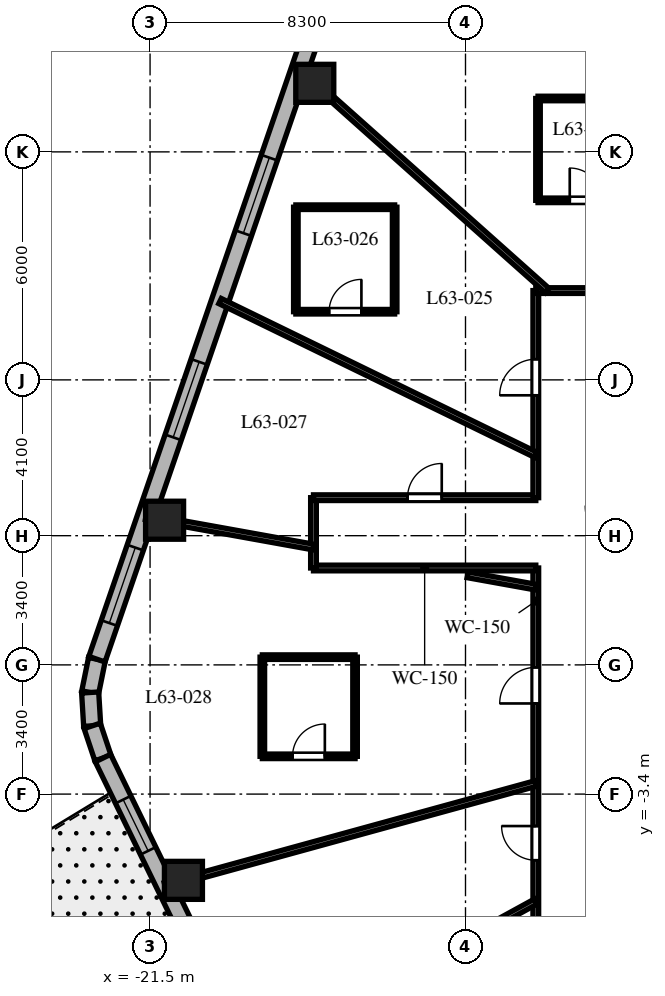
"""IFC4 building model, lengths in metres.
Left out: names, types, materials, properties, quantities, classifications, styles, units other than length and angle.
Written with IfcOpenShell. Run it as: python <this file> out.ifc"""

import sys

from ifc_helpers import new_model, si_unit, direction, frame, frame_2d, origin, origin_2d, place, context, subcontext, project, spatial, rectangle, extrude, element, fill, save


model = new_model("IFC4")
c1 = context("Model", 3, precision=1e-05, world=origin(), true_north=direction((0.0, 1.0)))
c2 = subcontext(c1, "Body", "Model", "MODEL_VIEW")
j1 = project(units=[si_unit("LENGTHUNIT", "METRE"), si_unit("PLANEANGLEUNIT", "RADIAN")], contexts=[c1])
p1 = place(None, origin())
s1 = spatial("IfcSite", under=j1, at=p1, CompositionType="ELEMENT")
p2 = place(p1, origin())
s2 = spatial("IfcBuilding", under=s1, at=p2, CompositionType="ELEMENT")
p3 = place(p2, frame((0.0, 0.0, 252.1)))
s3 = spatial("IfcBuildingStorey", under=s2, at=p3, CompositionType="ELEMENT", Elevation=252.1)
for number, where, z_axis, x_axis in (
    (1, (-17.166, 15.304, 0.0), (0.0, 0.0, 1.0), (1.0, 0.0, 0.0)),
    (2, (-21.118, 3.807, 0.0), (0.0, 0.0, 1.0), (1.0, 0.0, 0.0)),
    (3, (-20.622, -5.67, 0.0), (0.0, 0.0, 1.0), (1.0, 0.0, 0.0)),
):
    element("IfcColumn", number, at=place(p3, frame(where, z_axis=z_axis, x_axis=x_axis)), inside=s3, PredefinedType="COLUMN", context=c2, shape_type="SweptSolid", body=[
        extrude(rectangle(XDim=1.0, YDim=1.0, at=origin_2d()), origin(), (0.0, 0.0, 1.0), 3.8),
    ])
p4 = place(p3, frame((-22.898, 0.15, 0.0), z_axis=(0.0, 0.0, 1.0), x_axis=(-0.199055826889, -0.979988151858, 0.0)))
e4 = element("IfcWall", 4, at=p4, inside=s3, PredefinedType="SOLIDWALL", context=c2, shape_type="SweptSolid", body=[
    extrude(rectangle(XDim=0.894, YDim=0.45, at=frame_2d((0.447, 0.0))), origin(), (0.0, 0.0, 1.0), 3.48),
])
p5 = place(p3, frame((-23.076, -0.727, 0.0), z_axis=(0.0, 0.0, 1.0), x_axis=(0.060805222108, -0.998149650586, 0.0)))
e5 = element("IfcWall", 5, at=p5, inside=s3, PredefinedType="SOLIDWALL", context=c2, shape_type="SweptSolid", body=[
    extrude(rectangle(XDim=0.879, YDim=0.45, at=frame_2d((0.44, 0.0))), origin(), (0.0, 0.0, 1.0), 3.48),
])
p6 = place(p3, frame((-23.023, -1.604, 0.0), z_axis=(0.0, 0.0, 1.0), x_axis=(0.316801227695, -0.948491951537, 0.0)))
e6 = element("IfcWall", 6, at=p6, inside=s3, PredefinedType="SOLIDWALL", context=c2, shape_type="SweptSolid", body=[
    extrude(rectangle(XDim=0.894, YDim=0.45, at=frame_2d((0.447, 0.0))), origin(), (0.0, 0.0, 1.0), 3.48),
])
p7 = place(p3, frame((-16.324, 19.275, 0.0), z_axis=(0.0, 0.0, 1.0), x_axis=(-0.325083142304, -0.945685439557, 0.0)))
e7 = element("IfcWall", 7, at=p7, inside=s3, PredefinedType="SOLIDWALL", context=c2, shape_type="SweptSolid", body=[
    extrude(rectangle(XDim=20.224, YDim=0.45, at=frame_2d((10.112, 0.0))), origin(), (0.0, 0.0, 1.0), 3.48),
])
p8 = place(p7, frame((0.953, 0.0, 0.8)))
e8 = element("IfcOpeningElement", 8, at=p8, cuts=e7, PredefinedType="OPENING", context=c2, shape_type="SweptSolid", body=[
    extrude(rectangle(XDim=2.1, YDim=1.85, at=frame_2d((1.05, 0.925))), frame((0.0, 0.235, 0.0), z_axis=(0.0, -1.0, 0.0), x_axis=(1.0, 0.0, 0.0)), (0.0, 0.0, 1.0), 0.47),
])
p9 = place(p7, frame((6.268, 0.0, 0.8)))
e9 = element("IfcOpeningElement", 9, at=p9, cuts=e7, PredefinedType="OPENING", context=c2, shape_type="SweptSolid", body=[
    extrude(rectangle(XDim=2.1, YDim=1.85, at=frame_2d((1.05, 0.925))), frame((0.0, 0.235, 0.0), z_axis=(0.0, -1.0, 0.0), x_axis=(1.0, 0.0, 0.0)), (0.0, 0.0, 1.0), 0.47),
])
p10 = place(p7, frame((11.95, 0.0, 0.8)))
e10 = element("IfcOpeningElement", 10, at=p10, cuts=e7, PredefinedType="OPENING", context=c2, shape_type="SweptSolid", body=[
    extrude(rectangle(XDim=2.1, YDim=1.85, at=frame_2d((1.05, 0.925))), frame((0.0, 0.235, 0.0), z_axis=(0.0, -1.0, 0.0), x_axis=(1.0, 0.0, 0.0)), (0.0, 0.0, 1.0), 0.47),
])
p11 = place(p7, frame((17.118, 0.0, 0.8)))
e11 = element("IfcOpeningElement", 11, at=p11, cuts=e7, PredefinedType="OPENING", context=c2, shape_type="SweptSolid", body=[
    extrude(rectangle(XDim=2.1, YDim=1.85, at=frame_2d((1.05, 0.925))), frame((0.0, 0.235, 0.0), z_axis=(0.0, -1.0, 0.0), x_axis=(1.0, 0.0, 0.0)), (0.0, 0.0, 1.0), 0.47),
])
p12 = place(p3, frame((-22.74, -2.452, 0.0), z_axis=(0.0, 0.0, 1.0), x_axis=(0.437753424814, -0.899095066755, 0.0)))
e12 = element("IfcWall", 12, at=p12, inside=s3, PredefinedType="SOLIDWALL", context=c2, shape_type="SweptSolid", body=[
    extrude(rectangle(XDim=19.137, YDim=0.45, at=frame_2d((9.569, 0.0))), origin(), (0.0, 0.0, 1.0), 3.48),
])
p13 = place(p12, frame((4.763, 0.0, 0.0)))
e13 = element("IfcOpeningElement", 13, at=p13, cuts=e12, PredefinedType="OPENING", context=c2, shape_type="SweptSolid", body=[
    extrude(rectangle(XDim=0.95, YDim=2.15, at=frame_2d((0.475, 1.075))), frame((0.0, 0.235, 0.0), z_axis=(0.0, -1.0, 0.0), x_axis=(1.0, 0.0, 0.0)), (0.0, 0.0, 1.0), 0.47),
])
p14 = place(p12, frame((1.216, 0.0, 0.8)))
e14 = element("IfcOpeningElement", 14, at=p14, cuts=e12, PredefinedType="OPENING", context=c2, shape_type="SweptSolid", body=[
    extrude(rectangle(XDim=1.5, YDim=1.8, at=frame_2d((0.75, 0.9))), frame((0.0, 0.235, 0.0), z_axis=(0.0, -1.0, 0.0), x_axis=(1.0, 0.0, 0.0)), (0.0, 0.0, 1.0), 0.47),
])
p15 = place(p12, frame((6.461, 0.0, 0.8)))
e15 = element("IfcOpeningElement", 15, at=p15, cuts=e12, PredefinedType="OPENING", context=c2, shape_type="SweptSolid", body=[
    extrude(rectangle(XDim=1.5, YDim=1.8, at=frame_2d((0.75, 0.9))), frame((0.0, 0.235, 0.0), z_axis=(0.0, -1.0, 0.0), x_axis=(1.0, 0.0, 0.0)), (0.0, 0.0, 1.0), 0.47),
])
p16 = place(p12, frame((11.156, 0.0, 0.8)))
e16 = element("IfcOpeningElement", 16, at=p16, cuts=e12, PredefinedType="OPENING", context=c2, shape_type="SweptSolid", body=[
    extrude(rectangle(XDim=1.5, YDim=1.8, at=frame_2d((0.75, 0.9))), frame((0.0, 0.235, 0.0), z_axis=(0.0, -1.0, 0.0), x_axis=(1.0, 0.0, 0.0)), (0.0, 0.0, 1.0), 0.47),
])
p17 = place(p12, frame((16.473, 0.0, 0.8)))
e17 = element("IfcOpeningElement", 17, at=p17, cuts=e12, PredefinedType="OPENING", context=c2, shape_type="SweptSolid", body=[
    extrude(rectangle(XDim=1.5, YDim=1.8, at=frame_2d((0.75, 0.9))), frame((0.0, 0.235, 0.0), z_axis=(0.0, -1.0, 0.0), x_axis=(1.0, 0.0, 0.0)), (0.0, 0.0, 1.0), 0.47),
])
p18 = place(p3, frame((-11.35, -9.85, 0.0), z_axis=(0.0, 0.0, 1.0), x_axis=(0.0, 1.0, 0.0)))
e18 = element("IfcWall", 18, at=p18, inside=s3, PredefinedType="PARTITIONING", context=c2, shape_type="SweptSolid", body=[
    extrude(rectangle(XDim=12.4, YDim=0.15, at=frame_2d((6.2, 0.0))), origin(), (0.0, 0.0, 1.0), 2.97),
])
p19 = place(p18, frame((8.835, 0.0, 0.0)))
e19 = element("IfcOpeningElement", 19, at=p19, cuts=e18, PredefinedType="OPENING", context=c2, shape_type="SweptSolid", body=[
    extrude(rectangle(XDim=0.95, YDim=2.03, at=frame_2d((0.475, 1.015))), frame((0.0, 0.085, 0.0), z_axis=(0.0, -1.0, 0.0), x_axis=(1.0, 0.0, 0.0)), (0.0, 0.0, 1.0), 0.17),
])
p20 = place(p18, frame((4.709, 0.0, 0.0)))
e20 = element("IfcOpeningElement", 20, at=p20, cuts=e18, PredefinedType="OPENING", context=c2, shape_type="SweptSolid", body=[
    extrude(rectangle(XDim=0.9, YDim=2.03, at=frame_2d((0.45, 1.015))), frame((0.0, 0.085, 0.0), z_axis=(0.0, -1.0, 0.0), x_axis=(1.0, 0.0, 0.0)), (0.0, 0.0, 1.0), 0.17),
])
p21 = place(p18, frame((1.457, 0.0, 0.0)))
e21 = element("IfcOpeningElement", 21, at=p21, cuts=e18, PredefinedType="OPENING", context=c2, shape_type="SweptSolid", body=[
    extrude(rectangle(XDim=0.95, YDim=2.03, at=frame_2d((0.475, 1.015))), frame((0.0, 0.085, 0.0), z_axis=(0.0, -1.0, 0.0), x_axis=(1.0, 0.0, 0.0)), (0.0, 0.0, 1.0), 0.17),
])
p22 = place(p3, frame((-11.35, 2.55, 0.0), z_axis=(0.0, 0.0, 1.0), x_axis=(-1.0, 0.0, 0.0)))
e22 = element("IfcWall", 22, at=p22, inside=s3, PredefinedType="PARTITIONING", context=c2, shape_type="SweptSolid", body=[
    extrude(rectangle(XDim=5.85, YDim=0.15, at=frame_2d((2.925, 0.0))), origin(), (0.0, 0.0, 1.0), 2.92),
])
p23 = place(p3, frame((-17.2, 2.55, 0.0), z_axis=(0.0, 0.0, 1.0), x_axis=(0.0, 1.0, 0.0)))
e23 = element("IfcWall", 23, at=p23, inside=s3, PredefinedType="PARTITIONING", context=c2, shape_type="SweptSolid", body=[
    extrude(rectangle(XDim=1.85, YDim=0.15, at=frame_2d((0.925, 0.0))), origin(), (0.0, 0.0, 1.0), 2.92),
])
p24 = place(p3, frame((-17.2, 4.4, 0.0), z_axis=(0.0, 0.0, 1.0), x_axis=(1.0, 0.0, 0.0)))
e24 = element("IfcWall", 24, at=p24, inside=s3, PredefinedType="PARTITIONING", context=c2, shape_type="SweptSolid", body=[
    extrude(rectangle(XDim=5.85, YDim=0.15, at=frame_2d((2.925, 0.0))), origin(), (0.0, 0.0, 1.0), 2.92),
])
p25 = place(p24, frame((2.475, 0.0, 0.0)))
e25 = element("IfcOpeningElement", 25, at=p25, cuts=e24, PredefinedType="OPENING", context=c2, shape_type="SweptSolid", body=[
    extrude(rectangle(XDim=0.9, YDim=2.03, at=frame_2d((0.45, 1.015))), frame((0.0, 0.085, 0.0), z_axis=(0.0, -1.0, 0.0), x_axis=(1.0, 0.0, 0.0)), (0.0, 0.0, 1.0), 0.17),
])
p26 = place(p3, frame((-11.35, 4.4, 0.0), z_axis=(0.0, 0.0, 1.0), x_axis=(0.0, 1.0, 0.0)))
e26 = element("IfcWall", 26, at=p26, inside=s3, PredefinedType="PARTITIONING", context=c2, shape_type="SweptSolid", body=[
    extrude(rectangle(XDim=5.45, YDim=0.15, at=frame_2d((2.725, 0.0))), origin(), (0.0, 0.0, 1.0), 2.97),
])
p27 = place(p26, frame((2.694, 0.0, 0.0)))
e27 = element("IfcOpeningElement", 27, at=p27, cuts=e26, PredefinedType="OPENING", context=c2, shape_type="SweptSolid", body=[
    extrude(rectangle(XDim=0.95, YDim=2.03, at=frame_2d((0.475, 1.015))), frame((0.0, 0.085, 0.0), z_axis=(0.0, -1.0, 0.0), x_axis=(1.0, 0.0, 0.0)), (0.0, 0.0, 1.0), 0.17),
])
p28 = place(p3, frame((-11.35, 9.85, 0.0), z_axis=(0.0, 0.0, 1.0), x_axis=(1.0, 0.0, 0.0)))
e28 = element("IfcWall", 28, at=p28, inside=s3, PredefinedType="PARTITIONING", context=c2, shape_type="SweptSolid", body=[
    extrude(rectangle(XDim=10.43, YDim=0.15, at=frame_2d((5.215, 0.0))), origin(), (0.0, 0.0, 1.0), 2.97),
])
p29 = place(p28, frame((8.362, 0.0, 0.0)))
e29 = element("IfcOpeningElement", 29, at=p29, cuts=e28, PredefinedType="OPENING", context=c2, shape_type="SweptSolid", body=[
    extrude(rectangle(XDim=0.95, YDim=2.03, at=frame_2d((0.475, 1.015))), frame((0.0, 0.085, 0.0), z_axis=(0.0, -1.0, 0.0), x_axis=(1.0, 0.0, 0.0)), (0.0, 0.0, 1.0), 0.17),
])
p30 = place(p28, frame((3.396, 0.0, 0.0)))
e30 = element("IfcOpeningElement", 30, at=p30, cuts=e28, PredefinedType="OPENING", context=c2, shape_type="SweptSolid", body=[
    extrude(rectangle(XDim=0.95, YDim=2.03, at=frame_2d((0.475, 1.015))), frame((0.0, 0.085, 0.0), z_axis=(0.0, -1.0, 0.0), x_axis=(1.0, 0.0, 0.0)), (0.0, 0.0, 1.0), 0.17),
])
p31 = place(p3, frame((-11.048, 9.85, 0.0), z_axis=(0.0, 0.0, 1.0), x_axis=(-0.746444434655, 0.665447748492, 0.0)))
e31 = element("IfcWall", 31, at=p31, inside=s3, PredefinedType="PARTITIONING", context=c2, shape_type="SweptSolid", body=[
    extrude(rectangle(XDim=8.732, YDim=0.15, at=frame_2d((4.366, 0.0))), origin(), (0.0, 0.0, 1.0), 2.72),
])
p32 = place(p3, frame((-11.35, 5.528, 0.0), z_axis=(0.0, 0.0, 1.0), x_axis=(-0.899038669565, 0.437869239188, 0.0)))
e32 = element("IfcWall", 32, at=p32, inside=s3, PredefinedType="PARTITIONING", context=c2, shape_type="SweptSolid", body=[
    extrude(rectangle(XDim=9.242, YDim=0.15, at=frame_2d((4.621, 0.0))), origin(), (0.0, 0.0, 1.0), 2.72),
])
p33 = place(p3, frame((-11.35, 2.046, 0.0), z_axis=(0.0, 0.0, 1.0), x_axis=(-0.984127783205, 0.177461281195, 0.0)))
e33 = element("IfcWall", 33, at=p33, inside=s3, PredefinedType="PARTITIONING", context=c2, shape_type="SweptSolid", body=[
    extrude(rectangle(XDim=1.826, YDim=0.15, at=frame_2d((0.913, 0.0))), origin(), (0.0, 0.0, 1.0), 3.48),
])
p34 = place(p3, frame((-17.2, 3.101, 0.0), z_axis=(0.0, 0.0, 1.0), x_axis=(-0.98413465883, 0.177423147559, 0.0)))
e34 = element("IfcWall", 34, at=p34, inside=s3, PredefinedType="PARTITIONING", context=c2, shape_type="SweptSolid", body=[
    extrude(rectangle(XDim=4.482, YDim=0.15, at=frame_2d((2.241, 0.0))), origin(), (0.0, 0.0, 1.0), 2.72),
])
p35 = place(p3, frame((-11.35, -3.121, 0.0), z_axis=(0.0, 0.0, 1.0), x_axis=(-0.964212793822, -0.265129568758, 0.0)))
e35 = element("IfcWall", 35, at=p35, inside=s3, PredefinedType="PARTITIONING", context=c2, shape_type="SweptSolid", body=[
    extrude(rectangle(XDim=10.12, YDim=0.15, at=frame_2d((5.06, 0.0))), origin(), (0.0, 0.0, 1.0), 2.72),
])
p36 = place(p3, frame((-11.35, -6.227, 0.0), z_axis=(0.0, 0.0, 1.0), x_axis=(-0.876723190824, -0.480995266786, 0.0)))
e36 = element("IfcWall", 36, at=p36, inside=s3, PredefinedType="PARTITIONING", context=c2, shape_type="SweptSolid", body=[
    extrude(rectangle(XDim=8.598, YDim=0.15, at=frame_2d((4.299, 0.0))), origin(), (0.0, 0.0, 1.0), 2.72),
])
p37 = place(p3, frame((-11.292, 12.225, 0.0), z_axis=(0.0, 0.0, 1.0), x_axis=(1.0, 0.0, 0.0)))
e37 = element("IfcWall", 37, at=p37, inside=s3, PredefinedType="PARTITIONING", context=c2, shape_type="SweptSolid", body=[
    extrude(rectangle(XDim=2.52, YDim=0.12, at=frame_2d((1.26, 0.0))), origin(), (0.0, 0.0, 1.0), 2.97),
])
p38 = place(p37, frame((0.835, 0.0, 0.0)))
e38 = element("IfcOpeningElement", 38, at=p38, cuts=e37, PredefinedType="OPENING", context=c2, shape_type="SweptSolid", body=[
    extrude(rectangle(XDim=0.85, YDim=2.03, at=frame_2d((0.425, 1.015))), frame((0.0, 0.07, 0.0), z_axis=(0.0, -1.0, 0.0), x_axis=(1.0, 0.0, 0.0)), (0.0, 0.0, 1.0), 0.14),
])
p39 = place(p3, frame((-8.772, 14.905, 0.0), z_axis=(0.0, 0.0, 1.0), x_axis=(-1.0, 0.0, 0.0)))
e39 = element("IfcWall", 39, at=p39, inside=s3, PredefinedType="PARTITIONING", context=c2, shape_type="SweptSolid", body=[
    extrude(rectangle(XDim=2.52, YDim=0.12, at=frame_2d((1.26, 0.0))), origin(), (0.0, 0.0, 1.0), 3.006),
])
p40 = place(p3, frame((-11.292, 14.905, 0.0), z_axis=(0.0, 0.0, 1.0), x_axis=(0.0, -1.0, 0.0)))
e40 = element("IfcWall", 40, at=p40, inside=s3, PredefinedType="PARTITIONING", context=c2, shape_type="SweptSolid", body=[
    extrude(rectangle(XDim=2.68, YDim=0.12, at=frame_2d((1.34, 0.0))), origin(), (0.0, 0.0, 1.0), 3.006),
])
p41 = place(p3, frame((-17.664, 9.294, 0.0), z_axis=(0.0, 0.0, 1.0), x_axis=(1.0, 0.0, 0.0)))
e41 = element("IfcWall", 41, at=p41, inside=s3, PredefinedType="PARTITIONING", context=c2, shape_type="SweptSolid", body=[
    extrude(rectangle(XDim=2.6, YDim=0.12, at=frame_2d((1.3, 0.0))), origin(), (0.0, 0.0, 1.0), 3.052),
])
p42 = place(p41, frame((0.875, 0.0, 0.0)))
e42 = element("IfcOpeningElement", 42, at=p42, cuts=e41, PredefinedType="OPENING", context=c2, shape_type="SweptSolid", body=[
    extrude(rectangle(XDim=0.85, YDim=2.03, at=frame_2d((0.425, 1.015))), frame((0.0, 0.07, 0.0), z_axis=(0.0, -1.0, 0.0), x_axis=(1.0, 0.0, 0.0)), (0.0, 0.0, 1.0), 0.14),
])
p43 = place(p3, frame((-15.064, 9.294, 0.0), z_axis=(0.0, 0.0, 1.0), x_axis=(0.0, 1.0, 0.0)))
e43 = element("IfcWall", 43, at=p43, inside=s3, PredefinedType="PARTITIONING", context=c2, shape_type="SweptSolid", body=[
    extrude(rectangle(XDim=2.75, YDim=0.12, at=frame_2d((1.375, 0.0))), origin(), (0.0, 0.0, 1.0), 3.052),
])
p44 = place(p3, frame((-15.064, 12.044, 0.0), z_axis=(0.0, 0.0, 1.0), x_axis=(-1.0, 0.0, 0.0)))
e44 = element("IfcWall", 44, at=p44, inside=s3, PredefinedType="PARTITIONING", context=c2, shape_type="SweptSolid", body=[
    extrude(rectangle(XDim=2.6, YDim=0.12, at=frame_2d((1.3, 0.0))), origin(), (0.0, 0.0, 1.0), 3.48),
])
p45 = place(p3, frame((-17.664, 12.044, 0.0), z_axis=(0.0, 0.0, 1.0), x_axis=(0.0, -1.0, 0.0)))
e45 = element("IfcWall", 45, at=p45, inside=s3, PredefinedType="PARTITIONING", context=c2, shape_type="SweptSolid", body=[
    extrude(rectangle(XDim=2.75, YDim=0.12, at=frame_2d((1.375, 0.0))), origin(), (0.0, 0.0, 1.0), 3.48),
])
p46 = place(p3, frame((-18.546, -2.406, 0.0), z_axis=(0.0, 0.0, 1.0), x_axis=(1.0, 0.0, 0.0)))
e46 = element("IfcWall", 46, at=p46, inside=s3, PredefinedType="PARTITIONING", context=c2, shape_type="SweptSolid", body=[
    extrude(rectangle(XDim=2.44, YDim=0.12, at=frame_2d((1.22, 0.0))), origin(), (0.0, 0.0, 1.0), 2.92),
])
p47 = place(p46, frame((0.795, 0.0, 0.0)))
e47 = element("IfcOpeningElement", 47, at=p47, cuts=e46, PredefinedType="OPENING", context=c2, shape_type="SweptSolid", body=[
    extrude(rectangle(XDim=0.85, YDim=2.03, at=frame_2d((0.425, 1.015))), frame((0.0, 0.07, 0.0), z_axis=(0.0, -1.0, 0.0), x_axis=(1.0, 0.0, 0.0)), (0.0, 0.0, 1.0), 0.14),
])
p48 = place(p3, frame((-16.106, -2.406, 0.0), z_axis=(0.0, 0.0, 1.0), x_axis=(0.0, 1.0, 0.0)))
e48 = element("IfcWall", 48, at=p48, inside=s3, PredefinedType="PARTITIONING", context=c2, shape_type="SweptSolid", body=[
    extrude(rectangle(XDim=2.61, YDim=0.12, at=frame_2d((1.305, 0.0))), origin(), (0.0, 0.0, 1.0), 3.48),
])
p49 = place(p3, frame((-16.106, 0.204, 0.0), z_axis=(0.0, 0.0, 1.0), x_axis=(-1.0, 0.0, 0.0)))
e49 = element("IfcWall", 49, at=p49, inside=s3, PredefinedType="PARTITIONING", context=c2, shape_type="SweptSolid", body=[
    extrude(rectangle(XDim=2.44, YDim=0.12, at=frame_2d((1.22, 0.0))), origin(), (0.0, 0.0, 1.0), 2.92),
])
p50 = place(p3, frame((-18.546, 0.204, 0.0), z_axis=(0.0, 0.0, 1.0), x_axis=(0.0, -1.0, 0.0)))
e50 = element("IfcWall", 50, at=p50, inside=s3, PredefinedType="PARTITIONING", context=c2, shape_type="SweptSolid", body=[
    extrude(rectangle(XDim=2.61, YDim=0.12, at=frame_2d((1.305, 0.0))), origin(), (0.0, 0.0, 1.0), 3.48),
])
p51 = place(p9, origin())
e51 = element("IfcWindow", 51, at=p51, inside=s3, PartitioningType="SINGLE_PANEL", PredefinedType="WINDOW", context=c2, shape_type="SweptSolid", body=[
    extrude(rectangle(XDim=2.1, YDim=1.85, at=frame_2d((1.05, 0.925))), frame((0.0, 0.03, 0.0), z_axis=(0.0, -1.0, 0.0), x_axis=(1.0, 0.0, 0.0)), (0.0, 0.0, 1.0), 0.06),
])
fill(e9, e51)
p52 = place(p10, origin())
e52 = element("IfcWindow", 52, at=p52, inside=s3, PartitioningType="SINGLE_PANEL", PredefinedType="WINDOW", context=c2, shape_type="SweptSolid", body=[
    extrude(rectangle(XDim=2.1, YDim=1.85, at=frame_2d((1.05, 0.925))), frame((0.0, 0.03, 0.0), z_axis=(0.0, -1.0, 0.0), x_axis=(1.0, 0.0, 0.0)), (0.0, 0.0, 1.0), 0.06),
])
fill(e10, e52)
p53 = place(p11, origin())
e53 = element("IfcWindow", 53, at=p53, inside=s3, PartitioningType="SINGLE_PANEL", PredefinedType="WINDOW", context=c2, shape_type="SweptSolid", body=[
    extrude(rectangle(XDim=2.1, YDim=1.85, at=frame_2d((1.05, 0.925))), frame((0.0, 0.03, 0.0), z_axis=(0.0, -1.0, 0.0), x_axis=(1.0, 0.0, 0.0)), (0.0, 0.0, 1.0), 0.06),
])
fill(e11, e53)
p54 = place(p14, origin())
e54 = element("IfcWindow", 54, at=p54, inside=s3, PartitioningType="SINGLE_PANEL", PredefinedType="WINDOW", context=c2, shape_type="SweptSolid", body=[
    extrude(rectangle(XDim=1.5, YDim=1.8, at=frame_2d((0.75, 0.9))), frame((0.0, 0.03, 0.0), z_axis=(0.0, -1.0, 0.0), x_axis=(1.0, 0.0, 0.0)), (0.0, 0.0, 1.0), 0.06),
])
fill(e14, e54)
p55 = place(p38, origin())
e55 = element("IfcDoor", 55, at=p55, inside=s3, OperationType="SINGLE_SWING_LEFT", PredefinedType="DOOR", context=c2, shape_type="SweptSolid", body=[
    extrude(rectangle(XDim=0.85, YDim=2.03, at=frame_2d((0.425, 1.015))), frame((0.0, 0.025, 0.0), z_axis=(0.0, -1.0, 0.0), x_axis=(1.0, 0.0, 0.0)), (0.0, 0.0, 1.0), 0.05),
])
fill(e38, e55)
p56 = place(p27, origin())
e56 = element("IfcDoor", 56, at=p56, inside=s3, OperationType="SINGLE_SWING_LEFT", PredefinedType="DOOR", context=c2, shape_type="SweptSolid", body=[
    extrude(rectangle(XDim=0.95, YDim=2.03, at=frame_2d((0.475, 1.015))), frame((0.0, 0.025, 0.0), z_axis=(0.0, -1.0, 0.0), x_axis=(1.0, 0.0, 0.0)), (0.0, 0.0, 1.0), 0.05),
])
fill(e27, e56)
p57 = place(p42, origin())
e57 = element("IfcDoor", 57, at=p57, inside=s3, OperationType="SINGLE_SWING_RIGHT", PredefinedType="DOOR", context=c2, shape_type="SweptSolid", body=[
    extrude(rectangle(XDim=0.85, YDim=2.03, at=frame_2d((0.425, 1.015))), frame((0.0, 0.025, 0.0), z_axis=(0.0, -1.0, 0.0), x_axis=(1.0, 0.0, 0.0)), (0.0, 0.0, 1.0), 0.05),
])
fill(e42, e57)
p58 = place(p25, origin())
e58 = element("IfcDoor", 58, at=p58, inside=s3, OperationType="SINGLE_SWING_RIGHT", PredefinedType="DOOR", context=c2, shape_type="SweptSolid", body=[
    extrude(rectangle(XDim=0.9, YDim=2.03, at=frame_2d((0.45, 1.015))), frame((0.0, 0.025, 0.0), z_axis=(0.0, -1.0, 0.0), x_axis=(1.0, 0.0, 0.0)), (0.0, 0.0, 1.0), 0.05),
])
fill(e25, e58)
p59 = place(p19, origin())
e59 = element("IfcDoor", 59, at=p59, inside=s3, OperationType="SINGLE_SWING_LEFT", PredefinedType="DOOR", context=c2, shape_type="SweptSolid", body=[
    extrude(rectangle(XDim=0.95, YDim=2.03, at=frame_2d((0.475, 1.015))), frame((0.0, 0.025, 0.0), z_axis=(0.0, -1.0, 0.0), x_axis=(1.0, 0.0, 0.0)), (0.0, 0.0, 1.0), 0.05),
])
fill(e19, e59)
p60 = place(p47, origin())
e60 = element("IfcDoor", 60, at=p60, inside=s3, OperationType="SINGLE_SWING_RIGHT", PredefinedType="DOOR", context=c2, shape_type="SweptSolid", body=[
    extrude(rectangle(XDim=0.85, YDim=2.03, at=frame_2d((0.425, 1.015))), frame((0.0, 0.025, 0.0), z_axis=(0.0, -1.0, 0.0), x_axis=(1.0, 0.0, 0.0)), (0.0, 0.0, 1.0), 0.05),
])
fill(e47, e60)
p61 = place(p20, origin())
e61 = element("IfcDoor", 61, at=p61, inside=s3, OperationType="SINGLE_SWING_RIGHT", PredefinedType="DOOR", context=c2, shape_type="SweptSolid", body=[
    extrude(rectangle(XDim=0.9, YDim=2.03, at=frame_2d((0.45, 1.015))), frame((0.0, 0.025, 0.0), z_axis=(0.0, -1.0, 0.0), x_axis=(1.0, 0.0, 0.0)), (0.0, 0.0, 1.0), 0.05),
])
fill(e20, e61)
save(model, sys.argv[1])
